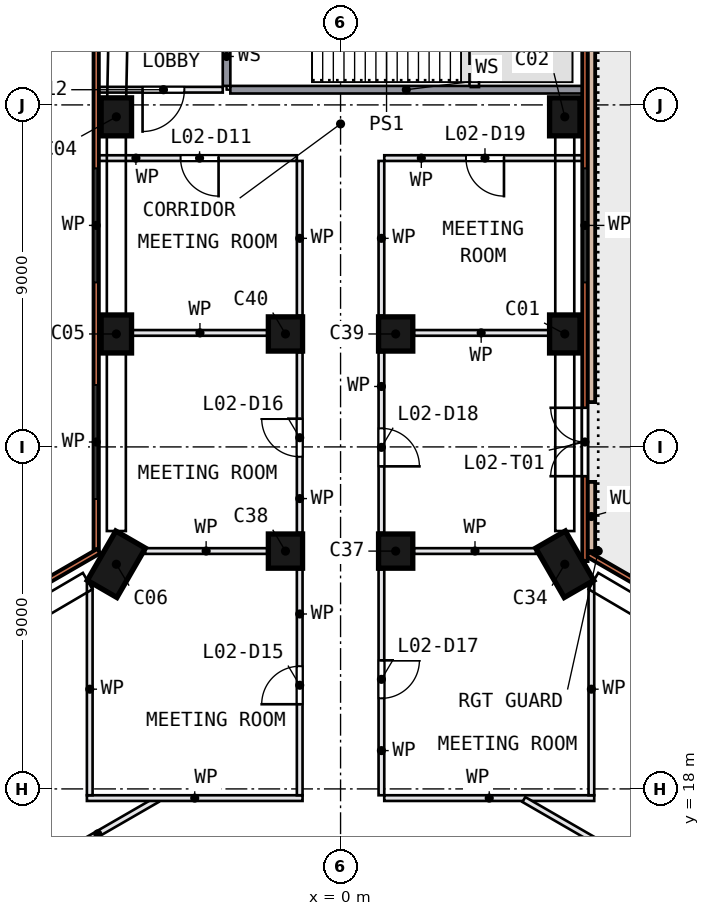
"""IFC4 building model, lengths in metres.
Left out: names, types, materials, properties, quantities, classifications, styles, units other than length and angle.
Written with IfcOpenShell. Run it as: python <this file> out.ifc"""

import sys

from ifc_helpers import new_model, si_unit, direction, frame, frame_2d, origin, origin_2d, place, context, subcontext, project, spatial, polyline, rectangle, outline, extrude, element, fill, save


model = new_model("IFC4")
c1 = context("Model", 3, precision=1e-05, world=origin(), true_north=direction((0.0, 1.0)))
c2 = subcontext(c1, "Body", "Model", "MODEL_VIEW")
j1 = project(units=[si_unit("LENGTHUNIT", "METRE"), si_unit("PLANEANGLEUNIT", "RADIAN")], contexts=[c1])
p1 = place(None, origin())
s1 = spatial("IfcSite", under=j1, at=p1, CompositionType="ELEMENT")
p2 = place(p1, origin())
s2 = spatial("IfcBuilding", under=s1, at=p2, CompositionType="ELEMENT")
p3 = place(p2, frame((0.0, 0.0, 14.0)))
s3 = spatial("IfcBuildingStorey", under=s2, at=p3, CompositionType="ELEMENT", Elevation=14.0)
for number, where, z_axis, x_axis in (
    (1, (5.9, 29.972, 0.0), (0.0, 0.0, 1.0), (0.0, 1.0, 0.0)),
    (2, (5.9, 35.686, 0.0), (0.0, 0.0, 1.0), (0.0, 1.0, 0.0)),
    (3, (-5.9, 35.686, 0.0), (0.0, 0.0, 1.0), (0.0, -1.0, 0.0)),
    (4, (-5.9, 29.972, 0.0), (0.0, 0.0, 1.0), (0.0, -1.0, 0.0)),
):
    element("IfcColumn", number, at=place(p3, frame(where, z_axis=z_axis, x_axis=x_axis)), inside=s3, PredefinedType="COLUMN", context=c2, shape_type="SweptSolid", body=[
        extrude(rectangle(XDim=1.0, YDim=0.8, at=origin_2d()), origin(), (0.0, 0.0, 1.0), 4.55),
    ])
for number, where, z_axis, x_axis in (
    (5, (-5.9, 23.912, 0.0), (0.0, 0.0, 1.0), (0.5, 0.866, 0.0)),
    (6, (5.9, 23.912, 0.0), (0.0, 0.0, 1.0), (0.5, -0.866, 0.0)),
):
    element("IfcColumn", number, at=place(p3, frame(where, z_axis=z_axis, x_axis=x_axis)), inside=s3, PredefinedType="COLUMN", context=c2, shape_type="SweptSolid", body=[
        extrude(rectangle(XDim=1.5, YDim=0.9, at=origin_2d()), origin(), (0.0, 0.0, 1.0), 4.55),
    ])
for number, where, z_axis, x_axis in (
    (7, (1.45, 24.258, 0.0), (0.0, 0.0, 1.0), (0.0, 1.0, 0.0)),
    (8, (-1.45, 24.258, 0.0), (0.0, 0.0, 1.0), (0.0, 1.0, 0.0)),
    (9, (1.45, 29.972, 0.0), (0.0, 0.0, 1.0), (0.0, 1.0, 0.0)),
    (10, (-1.45, 29.972, 0.0), (0.0, 0.0, 1.0), (0.0, 1.0, 0.0)),
):
    element("IfcColumn", number, at=place(p3, frame(where, z_axis=z_axis, x_axis=x_axis)), inside=s3, PredefinedType="COLUMN", context=c2, shape_type="SweptSolid", body=[
        extrude(rectangle(XDim=0.9, YDim=0.9, at=origin_2d()), origin(), (0.0, 0.0, 1.0), 4.55),
    ])
p4 = place(p3, frame((17.586, 17.777, 0.0), z_axis=(0.0, 0.0, 1.0), x_axis=(-0.866023287, 0.500003667, 0.0)))
e11 = element("IfcWall", 11, at=p4, inside=s3, PredefinedType="SOLIDWALL", context=c2, shape_type="SweptSolid", body=[
    extrude(rectangle(XDim=12.801, YDim=0.14, at=frame_2d((6.4, 0.0))), origin(), (0.0, 0.0, 1.0), 4.55),
])
p5 = place(p3, frame((6.43, 23.995, 0.0), z_axis=(0.0, 0.0, 1.0), x_axis=(0.0, 1.0, 0.0)))
e12 = element("IfcWall", 12, at=p5, inside=s3, PredefinedType="SOLIDWALL", context=c2, shape_type="SweptSolid", body=[
    extrude(rectangle(XDim=17.405, YDim=0.14, at=frame_2d((8.702, 0.0))), origin(), (0.0, 0.0, 1.0), 4.55),
])
p6 = place(p5, frame((2.234, 0.0, 0.0)))
e13 = element("IfcOpeningElement", 13, at=p6, cuts=e12, PredefinedType="OPENING", context=c2, shape_type="SweptSolid", body=[
    extrude(rectangle(XDim=1.8, YDim=2.4, at=frame_2d((0.9, 1.2))), frame((0.0, 0.08, 0.0), z_axis=(0.0, -1.0, 0.0), x_axis=(1.0, 0.0, 0.0)), (0.0, 0.0, 1.0), 0.16),
])
p7 = place(p5, frame((7.334, 0.0, 0.9)))
e14 = element("IfcOpeningElement", 14, at=p7, cuts=e12, PredefinedType="OPENING", context=c2, shape_type="SweptSolid", body=[
    extrude(rectangle(XDim=3.0, YDim=2.7, at=frame_2d((1.5, 1.35))), frame((0.0, 0.08, 0.0), z_axis=(0.0, -1.0, 0.0), x_axis=(1.0, 0.0, 0.0)), (0.0, 0.0, 1.0), 0.16),
])
p8 = place(p3, frame((-6.43, 41.26, 0.0), z_axis=(0.0, 0.0, 1.0), x_axis=(0.0, -1.0, 0.0)))
e15 = element("IfcWall", 15, at=p8, inside=s3, PredefinedType="SOLIDWALL", context=c2, shape_type="SweptSolid", body=[
    extrude(rectangle(XDim=16.961, YDim=0.14, at=frame_2d((8.481, 0.0))), origin(), (0.0, 0.0, 1.0), 4.55),
])
p9 = place(p8, frame((6.931, 0.0, 0.9)))
e16 = element("IfcOpeningElement", 16, at=p9, cuts=e15, PredefinedType="OPENING", context=c2, shape_type="SweptSolid", body=[
    extrude(rectangle(XDim=3.0, YDim=2.7, at=frame_2d((1.5, 1.35))), frame((0.0, 0.08, 0.0), z_axis=(0.0, -1.0, 0.0), x_axis=(1.0, 0.0, 0.0)), (0.0, 0.0, 1.0), 0.16),
])
p10 = place(p8, frame((12.631, 0.0, 0.9)))
e17 = element("IfcOpeningElement", 17, at=p10, cuts=e15, PredefinedType="OPENING", context=c2, shape_type="SweptSolid", body=[
    extrude(rectangle(XDim=3.0, YDim=2.7, at=frame_2d((1.5, 1.35))), frame((0.0, 0.08, 0.0), z_axis=(0.0, -1.0, 0.0), x_axis=(1.0, 0.0, 0.0)), (0.0, 0.0, 1.0), 0.16),
])
p11 = place(p3, frame((-6.36, 24.258, 0.0), z_axis=(0.0, 0.0, 1.0), x_axis=(-0.866029009, -0.499993756, 0.0)))
e18 = element("IfcWall", 18, at=p11, inside=s3, PredefinedType="SOLIDWALL", context=c2, shape_type="SweptSolid", body=[
    extrude(rectangle(XDim=13.242, YDim=0.14, at=frame_2d((6.621, 0.0))), origin(), (0.0, 0.0, 1.0), 4.55),
])
p12 = place(p11, frame((1.46, 0.0, 0.9)))
e19 = element("IfcOpeningElement", 19, at=p12, cuts=e18, PredefinedType="OPENING", context=c2, shape_type="SweptSolid", body=[
    extrude(rectangle(XDim=3.6, YDim=2.7, at=frame_2d((1.8, 1.35))), frame((0.0, 0.08, 0.0), z_axis=(0.0, -1.0, 0.0), x_axis=(1.0, 0.0, 0.0)), (0.0, 0.0, 1.0), 0.16),
])
p13 = place(p11, frame((8.215, 0.0, 0.9)))
e20 = element("IfcOpeningElement", 20, at=p13, cuts=e18, PredefinedType="OPENING", context=c2, shape_type="SweptSolid", body=[
    extrude(rectangle(XDim=3.0, YDim=2.7, at=frame_2d((1.5, 1.35))), frame((0.0, 0.08, 0.0), z_axis=(0.0, -1.0, 0.0), x_axis=(1.0, 0.0, 0.0)), (0.0, 0.0, 1.0), 0.16),
])
p14 = place(p3, origin())
e21 = element("IfcWall", 21, at=p14, inside=s3, PredefinedType="SOLIDWALL", context=c2, shape_type="SweptSolid", body=[
    extrude(outline(polyline([(6.5, 41.4), (6.5, 28.179), (6.7, 28.179), (6.7, 41.2), (6.5, 41.4)])), origin(), (0.0, 0.0, 1.0), 0.45),
])
p15 = place(p3, origin())
e22 = element("IfcWall", 22, at=p15, inside=s3, PredefinedType="SOLIDWALL", context=c2, shape_type="SweptSolid", body=[
    extrude(outline(polyline([(6.7, 24.258), (6.7, 26.079), (6.5, 26.079), (6.5, 24.258), (6.7, 24.258)])), origin(), (0.0, 0.0, 1.0), 0.45),
])
p16 = place(p3, frame((-4.823, 17.721, 0.0), z_axis=(0.0, 0.0, 1.0), x_axis=(-0.866037142, -0.499979668, 0.0)))
e23 = element("IfcWall", 23, at=p16, inside=s3, PredefinedType="PARTITIONING", context=c2, shape_type="SweptSolid", body=[
    extrude(rectangle(XDim=9.367, YDim=0.15, at=frame_2d((4.683, 0.0))), origin(), (0.0, 0.0, 1.0), 4.55),
])
p17 = place(p16, frame((3.817, 0.0, 0.0)))
e24 = element("IfcOpeningElement", 24, at=p17, cuts=e23, PredefinedType="OPENING", context=c2, shape_type="SweptSolid", body=[
    extrude(rectangle(XDim=1.8, YDim=2.1, at=frame_2d((0.9, 1.05))), frame((0.0, 0.085, 0.0), z_axis=(0.0, -1.0, 0.0), x_axis=(1.0, 0.0, 0.0)), (0.0, 0.0, 1.0), 0.17),
])
p18 = place(p3, frame((-6.675, 17.758, 0.0), z_axis=(0.0, 0.0, 1.0), x_axis=(1.0, 0.0, 0.0)))
e25 = element("IfcWall", 25, at=p18, inside=s3, PredefinedType="PARTITIONING", context=c2, shape_type="SweptSolid", body=[
    extrude(rectangle(XDim=5.675, YDim=0.15, at=frame_2d((2.838, 0.0))), origin(), (0.0, 0.0, 1.0), 4.55),
])
p19 = place(p3, frame((-6.6, 23.415, 0.0), z_axis=(0.0, 0.0, 1.0), x_axis=(0.0, -1.0, 0.0)))
e26 = element("IfcWall", 26, at=p19, inside=s3, PredefinedType="PARTITIONING", context=c2, shape_type="SweptSolid", body=[
    extrude(rectangle(XDim=5.582, YDim=0.15, at=frame_2d((2.791, 0.0))), origin(), (0.0, 0.0, 1.0), 4.55),
])
p20 = place(p3, frame((-1.15, 34.6, 0.0), z_axis=(0.0, 0.0, 1.0), x_axis=(-1.0, 0.0, 0.0)))
e27 = element("IfcWall", 27, at=p20, inside=s3, PredefinedType="PARTITIONING", context=c2, shape_type="SweptSolid", body=[
    extrude(rectangle(XDim=5.21, YDim=0.15, at=frame_2d((2.605, 0.0))), origin(), (0.0, 0.0, 1.0), 4.55),
])
p21 = place(p20, frame((2.06, 0.0, 0.0)))
e28 = element("IfcOpeningElement", 28, at=p21, cuts=e27, PredefinedType="OPENING", context=c2, shape_type="SweptSolid", body=[
    extrude(rectangle(XDim=1.0, YDim=2.1, at=frame_2d((0.5, 1.05))), frame((0.0, 0.085, 0.0), z_axis=(0.0, -1.0, 0.0), x_axis=(1.0, 0.0, 0.0)), (0.0, 0.0, 1.0), 0.17),
])
p22 = place(p3, frame((-3.1, 36.4, 0.0), z_axis=(0.0, 0.0, 1.0), x_axis=(-1.0, 0.0, 0.0)))
e29 = element("IfcWall", 29, at=p22, inside=s3, PredefinedType="PARTITIONING", context=c2, shape_type="SweptSolid", body=[
    extrude(rectangle(XDim=3.26, YDim=0.15, at=frame_2d((1.63, 0.0))), origin(), (0.0, 0.0, 1.0), 4.55),
])
p23 = place(p22, frame((1.01, 0.0, 0.0)))
e30 = element("IfcOpeningElement", 30, at=p23, cuts=e29, PredefinedType="OPENING", context=c2, shape_type="SweptSolid", body=[
    extrude(rectangle(XDim=1.1, YDim=2.1, at=frame_2d((0.55, 1.05))), frame((0.0, 0.085, 0.0), z_axis=(0.0, -1.0, 0.0), x_axis=(1.0, 0.0, 0.0)), (0.0, 0.0, 1.0), 0.17),
])
p24 = place(p3, frame((-2.9, 36.4, 0.0), z_axis=(0.0, 0.0, 1.0), x_axis=(1.0, 0.0, 0.0)))
e31 = element("IfcWall", 31, at=p24, inside=s3, PredefinedType="SOLIDWALL", context=c2, shape_type="SweptSolid", body=[
    extrude(rectangle(XDim=9.26, YDim=0.2, at=frame_2d((4.63, 0.0))), origin(), (0.0, 0.0, 1.0), 4.55),
])
p25 = place(p3, frame((-3.0, 36.5, 0.0), z_axis=(0.0, 0.0, 1.0), x_axis=(0.0, 1.0, 0.0)))
e32 = element("IfcWall", 32, at=p25, inside=s3, PredefinedType="SOLIDWALL", context=c2, shape_type="SweptSolid", body=[
    extrude(rectangle(XDim=4.6, YDim=0.2, at=frame_2d((2.3, 0.0))), origin(), (0.0, 0.0, 1.0), 4.55),
])
p26 = place(p25, frame((1.75, 0.0, 0.0)))
e33 = element("IfcOpeningElement", 33, at=p26, cuts=e32, PredefinedType="OPENING", context=c2, shape_type="SweptSolid", body=[
    extrude(rectangle(XDim=1.1, YDim=2.1, at=frame_2d((0.55, 1.05))), frame((0.0, 0.11, 0.0), z_axis=(0.0, -1.0, 0.0), x_axis=(1.0, 0.0, 0.0)), (0.0, 0.0, 1.0), 0.22),
])
p27 = place(p3, frame((-1.93, 24.26, 0.0), z_axis=(0.0, 0.0, 1.0), x_axis=(-1.0, 0.0, 0.0)))
e34 = element("IfcWall", 34, at=p27, inside=s3, PredefinedType="PARTITIONING", context=c2, shape_type="SweptSolid", body=[
    extrude(rectangle(XDim=3.215, YDim=0.15, at=frame_2d((1.607, 0.0))), origin(), (0.0, 0.0, 1.0), 4.55),
])
p28 = place(p3, frame((-1.93, 30.0, 0.0), z_axis=(0.0, 0.0, 1.0), x_axis=(-1.0, 0.0, 0.0)))
e35 = element("IfcWall", 35, at=p28, inside=s3, PredefinedType="PARTITIONING", context=c2, shape_type="SweptSolid", body=[
    extrude(rectangle(XDim=3.54, YDim=0.15, at=frame_2d((1.77, 0.0))), origin(), (0.0, 0.0, 1.0), 4.55),
])
p29 = place(p3, frame((-1.075, 17.833, 0.0), z_axis=(0.0, 0.0, 1.0), x_axis=(0.0, 1.0, 0.0)))
e36 = element("IfcWall", 36, at=p29, inside=s3, PredefinedType="PARTITIONING", context=c2, shape_type="SweptSolid", body=[
    extrude(rectangle(XDim=5.945, YDim=0.15, at=frame_2d((2.973, 0.0))), origin(), (0.0, 0.0, 1.0), 4.55),
])
p30 = place(p29, frame((2.395, 0.0, 0.0)))
e37 = element("IfcOpeningElement", 37, at=p30, cuts=e36, PredefinedType="OPENING", context=c2, shape_type="SweptSolid", body=[
    extrude(rectangle(XDim=1.0, YDim=2.1, at=frame_2d((0.5, 1.05))), frame((0.0, 0.085, 0.0), z_axis=(0.0, -1.0, 0.0), x_axis=(1.0, 0.0, 0.0)), (0.0, 0.0, 1.0), 0.17),
])
p31 = place(p3, frame((-1.075, 24.738, 0.0), z_axis=(0.0, 0.0, 1.0), x_axis=(0.0, 1.0, 0.0)))
e38 = element("IfcWall", 38, at=p31, inside=s3, PredefinedType="PARTITIONING", context=c2, shape_type="SweptSolid", body=[
    extrude(rectangle(XDim=4.754, YDim=0.15, at=frame_2d((2.377, 0.0))), origin(), (0.0, 0.0, 1.0), 4.55),
])
p32 = place(p31, frame((2.004, 0.0, 0.0)))
e39 = element("IfcOpeningElement", 39, at=p32, cuts=e38, PredefinedType="OPENING", context=c2, shape_type="SweptSolid", body=[
    extrude(rectangle(XDim=1.0, YDim=2.1, at=frame_2d((0.5, 1.05))), frame((0.0, 0.085, 0.0), z_axis=(0.0, -1.0, 0.0), x_axis=(1.0, 0.0, 0.0)), (0.0, 0.0, 1.0), 0.17),
])
p33 = place(p3, frame((-1.075, 34.525, 0.0), z_axis=(0.0, 0.0, 1.0), x_axis=(0.0, -1.0, 0.0)))
e40 = element("IfcWall", 40, at=p33, inside=s3, PredefinedType="PARTITIONING", context=c2, shape_type="SweptSolid", body=[
    extrude(rectangle(XDim=4.073, YDim=0.15, at=frame_2d((2.036, 0.0))), origin(), (0.0, 0.0, 1.0), 4.55),
])
p34 = place(p3, frame((1.075, 23.778, 0.0), z_axis=(0.0, 0.0, 1.0), x_axis=(0.0, -1.0, 0.0)))
e41 = element("IfcWall", 41, at=p34, inside=s3, PredefinedType="PARTITIONING", context=c2, shape_type="SweptSolid", body=[
    extrude(rectangle(XDim=5.945, YDim=0.15, at=frame_2d((2.973, 0.0))), origin(), (0.0, 0.0, 1.0), 4.55),
])
p35 = place(p34, frame((2.395, 0.0, 0.0)))
e42 = element("IfcOpeningElement", 42, at=p35, cuts=e41, PredefinedType="OPENING", context=c2, shape_type="SweptSolid", body=[
    extrude(rectangle(XDim=1.0, YDim=2.1, at=frame_2d((0.5, 1.05))), frame((0.0, 0.085, 0.0), z_axis=(0.0, -1.0, 0.0), x_axis=(1.0, 0.0, 0.0)), (0.0, 0.0, 1.0), 0.17),
])
p36 = place(p3, frame((1.075, 29.492, 0.0), z_axis=(0.0, 0.0, 1.0), x_axis=(0.0, -1.0, 0.0)))
e43 = element("IfcWall", 43, at=p36, inside=s3, PredefinedType="PARTITIONING", context=c2, shape_type="SweptSolid", body=[
    extrude(rectangle(XDim=4.754, YDim=0.15, at=frame_2d((2.377, 0.0))), origin(), (0.0, 0.0, 1.0), 4.55),
])
p37 = place(p36, frame((2.004, 0.0, 0.0)))
e44 = element("IfcOpeningElement", 44, at=p37, cuts=e43, PredefinedType="OPENING", context=c2, shape_type="SweptSolid", body=[
    extrude(rectangle(XDim=1.0, YDim=2.1, at=frame_2d((0.5, 1.05))), frame((0.0, 0.085, 0.0), z_axis=(0.0, -1.0, 0.0), x_axis=(1.0, 0.0, 0.0)), (0.0, 0.0, 1.0), 0.17),
])
p38 = place(p3, frame((1.075, 30.452, 0.0), z_axis=(0.0, 0.0, 1.0), x_axis=(0.0, 1.0, 0.0)))
e45 = element("IfcWall", 45, at=p38, inside=s3, PredefinedType="PARTITIONING", context=c2, shape_type="SweptSolid", body=[
    extrude(rectangle(XDim=4.073, YDim=0.15, at=frame_2d((2.036, 0.0))), origin(), (0.0, 0.0, 1.0), 4.55),
])
p39 = place(p3, frame((1.15, 17.758, 0.0), z_axis=(0.0, 0.0, 1.0), x_axis=(1.0, 0.0, 0.0)))
e46 = element("IfcWall", 46, at=p39, inside=s3, PredefinedType="PARTITIONING", context=c2, shape_type="SweptSolid", body=[
    extrude(rectangle(XDim=5.525, YDim=0.15, at=frame_2d((2.763, 0.0))), origin(), (0.0, 0.0, 1.0), 4.55),
])
p40 = place(p3, frame((6.36, 34.6, 0.0), z_axis=(0.0, 0.0, 1.0), x_axis=(-1.0, 0.0, 0.0)))
e47 = element("IfcWall", 47, at=p40, inside=s3, PredefinedType="PARTITIONING", context=c2, shape_type="SweptSolid", body=[
    extrude(rectangle(XDim=5.21, YDim=0.15, at=frame_2d((2.605, 0.0))), origin(), (0.0, 0.0, 1.0), 4.55),
])
p41 = place(p40, frame((2.06, 0.0, 0.0)))
e48 = element("IfcOpeningElement", 48, at=p41, cuts=e47, PredefinedType="OPENING", context=c2, shape_type="SweptSolid", body=[
    extrude(rectangle(XDim=1.0, YDim=2.1, at=frame_2d((0.5, 1.05))), frame((0.0, 0.085, 0.0), z_axis=(0.0, -1.0, 0.0), x_axis=(1.0, 0.0, 0.0)), (0.0, 0.0, 1.0), 0.17),
])
p42 = place(p3, frame((4.823, 17.721, 0.0), z_axis=(0.0, 0.0, 1.0), x_axis=(0.866037142, -0.499979668, 0.0)))
e49 = element("IfcWall", 49, at=p42, inside=s3, PredefinedType="PARTITIONING", context=c2, shape_type="SweptSolid", body=[
    extrude(rectangle(XDim=9.367, YDim=0.15, at=frame_2d((4.683, 0.0))), origin(), (0.0, 0.0, 1.0), 4.55),
])
p43 = place(p42, frame((4.15, 0.0, 0.0)))
e50 = element("IfcOpeningElement", 50, at=p43, cuts=e49, PredefinedType="OPENING", context=c2, shape_type="SweptSolid", body=[
    extrude(rectangle(XDim=1.0, YDim=2.1, at=frame_2d((0.5, 1.05))), frame((0.0, 0.085, 0.0), z_axis=(0.0, -1.0, 0.0), x_axis=(1.0, 0.0, 0.0)), (0.0, 0.0, 1.0), 0.17),
])
p44 = place(p3, frame((5.145, 24.26, 0.0), z_axis=(0.0, 0.0, 1.0), x_axis=(-1.0, 0.0, 0.0)))
e51 = element("IfcWall", 51, at=p44, inside=s3, PredefinedType="PARTITIONING", context=c2, shape_type="SweptSolid", body=[
    extrude(rectangle(XDim=3.215, YDim=0.15, at=frame_2d((1.607, 0.0))), origin(), (0.0, 0.0, 1.0), 4.55),
])
p45 = place(p3, frame((5.47, 30.0, 0.0), z_axis=(0.0, 0.0, 1.0), x_axis=(-1.0, 0.0, 0.0)))
e52 = element("IfcWall", 52, at=p45, inside=s3, PredefinedType="PARTITIONING", context=c2, shape_type="SweptSolid", body=[
    extrude(rectangle(XDim=3.54, YDim=0.15, at=frame_2d((1.77, 0.0))), origin(), (0.0, 0.0, 1.0), 4.55),
])
p46 = place(p3, frame((6.6, 17.833, 0.0), z_axis=(0.0, 0.0, 1.0), x_axis=(0.0, 1.0, 0.0)))
e53 = element("IfcWall", 53, at=p46, inside=s3, PredefinedType="PARTITIONING", context=c2, shape_type="SweptSolid", body=[
    extrude(rectangle(XDim=5.582, YDim=0.15, at=frame_2d((2.791, 0.0))), origin(), (0.0, 0.0, 1.0), 4.55),
])
p47 = place(p6, origin())
e54 = element("IfcDoor", 54, at=p47, inside=s3, OperationType="DOUBLE_DOOR_SINGLE_SWING", PredefinedType="DOOR", context=c2, shape_type="SweptSolid", body=[
    extrude(rectangle(XDim=1.8, YDim=2.4, at=frame_2d((0.9, 1.2))), frame((0.0, 0.025, 0.0), z_axis=(0.0, -1.0, 0.0), x_axis=(1.0, 0.0, 0.0)), (0.0, 0.0, 1.0), 0.05),
])
fill(e13, e54)
p48 = place(p7, origin())
e55 = element("IfcWindow", 55, at=p48, inside=s3, PartitioningType="SINGLE_PANEL", PredefinedType="WINDOW", context=c2, shape_type="SweptSolid", body=[
    extrude(rectangle(XDim=3.0, YDim=2.7, at=frame_2d((1.5, 1.35))), frame((0.0, 0.03, 0.0), z_axis=(0.0, -1.0, 0.0), x_axis=(1.0, 0.0, 0.0)), (0.0, 0.0, 1.0), 0.06),
])
fill(e14, e55)
p49 = place(p9, origin())
e56 = element("IfcWindow", 56, at=p49, inside=s3, PartitioningType="SINGLE_PANEL", PredefinedType="WINDOW", context=c2, shape_type="SweptSolid", body=[
    extrude(rectangle(XDim=3.0, YDim=2.7, at=frame_2d((1.5, 1.35))), frame((0.0, 0.03, 0.0), z_axis=(0.0, -1.0, 0.0), x_axis=(1.0, 0.0, 0.0)), (0.0, 0.0, 1.0), 0.06),
])
fill(e16, e56)
p50 = place(p10, origin())
e57 = element("IfcWindow", 57, at=p50, inside=s3, PartitioningType="SINGLE_PANEL", PredefinedType="WINDOW", context=c2, shape_type="SweptSolid", body=[
    extrude(rectangle(XDim=3.0, YDim=2.7, at=frame_2d((1.5, 1.35))), frame((0.0, 0.03, 0.0), z_axis=(0.0, -1.0, 0.0), x_axis=(1.0, 0.0, 0.0)), (0.0, 0.0, 1.0), 0.06),
])
fill(e17, e57)
p51 = place(p21, origin())
e58 = element("IfcDoor", 58, at=p51, inside=s3, OperationType="SINGLE_SWING_LEFT", PredefinedType="DOOR", context=c2, shape_type="SweptSolid", body=[
    extrude(rectangle(XDim=1.0, YDim=2.1, at=frame_2d((0.5, 1.05))), frame((0.0, 0.025, 0.0), z_axis=(0.0, -1.0, 0.0), x_axis=(1.0, 0.0, 0.0)), (0.0, 0.0, 1.0), 0.05),
])
fill(e28, e58)
p52 = place(p23, origin())
e59 = element("IfcDoor", 59, at=p52, inside=s3, OperationType="SINGLE_SWING_RIGHT", PredefinedType="DOOR", context=c2, shape_type="SweptSolid", body=[
    extrude(rectangle(XDim=1.1, YDim=2.1, at=frame_2d((0.55, 1.05))), frame((0.0, 0.025, 0.0), z_axis=(0.0, -1.0, 0.0), x_axis=(1.0, 0.0, 0.0)), (0.0, 0.0, 1.0), 0.05),
])
fill(e30, e59)
p53 = place(p30, origin())
e60 = element("IfcDoor", 60, at=p53, inside=s3, OperationType="SINGLE_SWING_LEFT", PredefinedType="DOOR", context=c2, shape_type="SweptSolid", body=[
    extrude(rectangle(XDim=1.0, YDim=2.1, at=frame_2d((0.5, 1.05))), frame((0.0, 0.025, 0.0), z_axis=(0.0, -1.0, 0.0), x_axis=(1.0, 0.0, 0.0)), (0.0, 0.0, 1.0), 0.05),
])
fill(e37, e60)
p54 = place(p32, origin())
e61 = element("IfcDoor", 61, at=p54, inside=s3, OperationType="SINGLE_SWING_RIGHT", PredefinedType="DOOR", context=c2, shape_type="SweptSolid", body=[
    extrude(rectangle(XDim=1.0, YDim=2.1, at=frame_2d((0.5, 1.05))), frame((0.0, 0.025, 0.0), z_axis=(0.0, -1.0, 0.0), x_axis=(1.0, 0.0, 0.0)), (0.0, 0.0, 1.0), 0.05),
])
fill(e39, e61)
p55 = place(p35, origin())
e62 = element("IfcDoor", 62, at=p55, inside=s3, OperationType="SINGLE_SWING_LEFT", PredefinedType="DOOR", context=c2, shape_type="SweptSolid", body=[
    extrude(rectangle(XDim=1.0, YDim=2.1, at=frame_2d((0.5, 1.05))), frame((0.0, 0.025, 0.0), z_axis=(0.0, -1.0, 0.0), x_axis=(1.0, 0.0, 0.0)), (0.0, 0.0, 1.0), 0.05),
])
fill(e42, e62)
p56 = place(p37, origin())
e63 = element("IfcDoor", 63, at=p56, inside=s3, OperationType="SINGLE_SWING_RIGHT", PredefinedType="DOOR", context=c2, shape_type="SweptSolid", body=[
    extrude(rectangle(XDim=1.0, YDim=2.1, at=frame_2d((0.5, 1.05))), frame((0.0, 0.025, 0.0), z_axis=(0.0, -1.0, 0.0), x_axis=(1.0, 0.0, 0.0)), (0.0, 0.0, 1.0), 0.05),
])
fill(e44, e63)
p57 = place(p41, origin())
e64 = element("IfcDoor", 64, at=p57, inside=s3, OperationType="SINGLE_SWING_LEFT", PredefinedType="DOOR", context=c2, shape_type="SweptSolid", body=[
    extrude(rectangle(XDim=1.0, YDim=2.1, at=frame_2d((0.5, 1.05))), frame((0.0, 0.025, 0.0), z_axis=(0.0, -1.0, 0.0), x_axis=(1.0, 0.0, 0.0)), (0.0, 0.0, 1.0), 0.05),
])
fill(e48, e64)
save(model, sys.argv[1])
